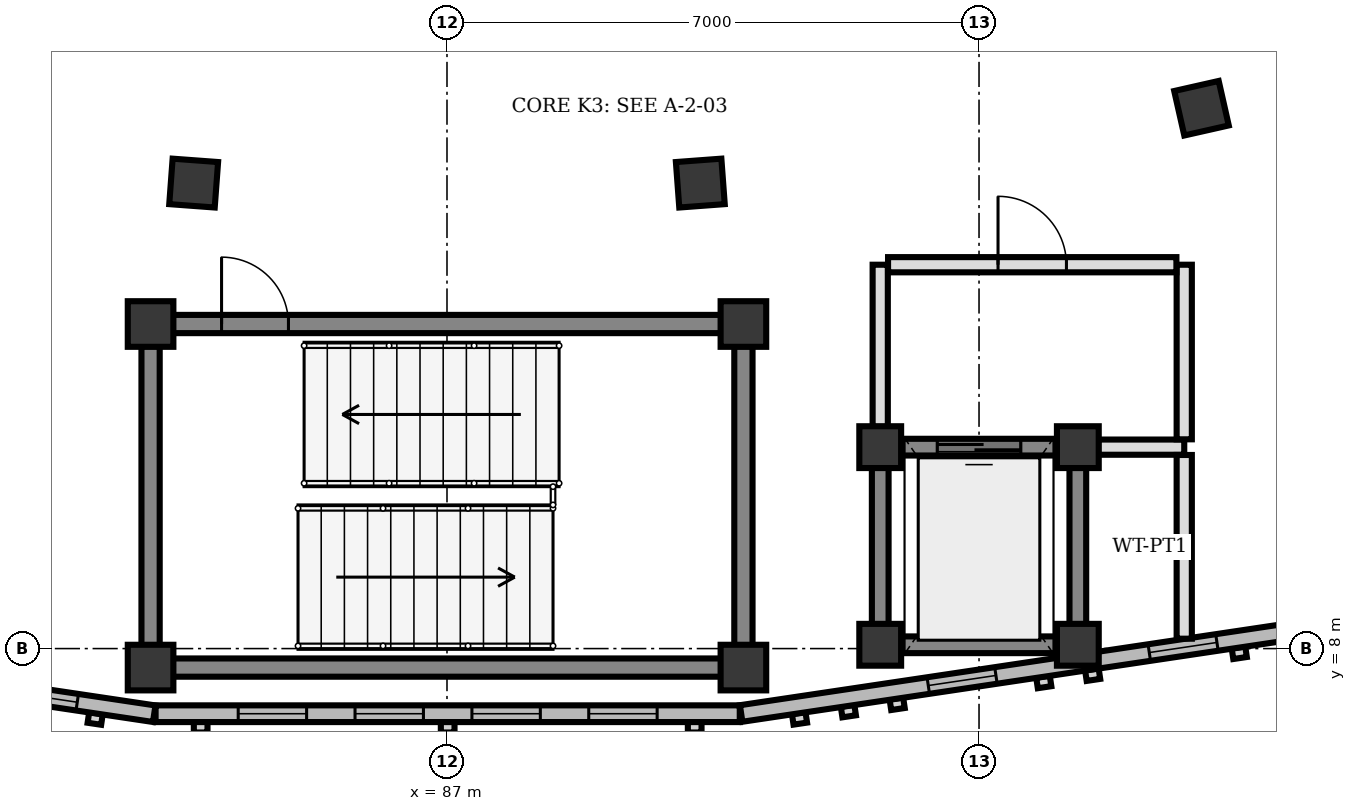
"""IFC4 building model, lengths in metres.
Left out: names, types, materials, properties, quantities, classifications, styles, units other than length and angle.
Written with IfcOpenShell. Run it as: python <this file> out.ifc"""

import sys

from ifc_helpers import new_model, si_unit, direction, frame, frame_2d, origin, origin_2d, place, context, subcontext, project, spatial, rectangle, extrude, element, fill, save


model = new_model("IFC4")
c1 = context("Model", 3, precision=1e-05, world=origin(), true_north=direction((0.0, 1.0)))
c2 = subcontext(c1, "Body", "Model", "MODEL_VIEW")
j1 = project(units=[si_unit("LENGTHUNIT", "METRE"), si_unit("PLANEANGLEUNIT", "RADIAN")], contexts=[c1])
p1 = place(None, origin())
s1 = spatial("IfcSite", under=j1, at=p1, CompositionType="ELEMENT")
p2 = place(p1, origin())
s2 = spatial("IfcBuilding", under=s1, at=p2, CompositionType="ELEMENT")
p3 = place(p2, origin())
s3 = spatial("IfcBuildingStorey", under=s2, at=p3, CompositionType="ELEMENT", Elevation=0.0)
for number, where, z_axis, x_axis in (
    (1, (83.1, 7.75, 0.0), (0.0, 0.0, 1.0), (1.0, 0.0, 0.0)),
    (2, (90.9, 7.75, 0.0), (0.0, 0.0, 1.0), (1.0, 0.0, 0.0)),
    (3, (90.9, 12.27, 0.0), (0.0, 0.0, 1.0), (1.0, 0.0, 0.0)),
    (4, (83.1, 12.27, 0.0), (0.0, 0.0, 1.0), (1.0, 0.0, 0.0)),
):
    element("IfcColumn", number, at=place(p3, frame(where, z_axis=z_axis, x_axis=x_axis)), inside=s3, PredefinedType="COLUMN", context=c2, shape_type="SweptSolid", body=[
        extrude(rectangle(XDim=0.6, YDim=0.6, at=origin_2d()), origin(), (0.0, 0.0, 1.0), 4.5),
    ])
for number, where, z_axis, x_axis in (
    (5, (92.7, 8.05, 0.0), (0.0, 0.0, 1.0), (1.0, 0.0, 0.0)),
    (6, (95.3, 8.05, 0.0), (0.0, 0.0, 1.0), (1.0, 0.0, 0.0)),
    (7, (95.3, 10.65, 0.0), (0.0, 0.0, 1.0), (1.0, 0.0, 0.0)),
    (8, (92.7, 10.65, 0.0), (0.0, 0.0, 1.0), (1.0, 0.0, 0.0)),
):
    element("IfcColumn", number, at=place(p3, frame(where, z_axis=z_axis, x_axis=x_axis)), inside=s3, PredefinedType="COLUMN", context=c2, shape_type="SweptSolid", body=[
        extrude(rectangle(XDim=0.55, YDim=0.55, at=origin_2d()), origin(), (0.0, 0.0, 1.0), 4.5),
    ])
for number, where, z_axis, x_axis in (
    (9, (83.667, 14.124, 0.0), (0.0, 0.0, 1.0), (-0.074, -0.997, 0.0)),
    (10, (90.333, 14.124, 0.0), (0.0, 0.0, 1.0), (0.074, -0.997, 0.0)),
    (11, (96.927, 15.109, 0.0), (0.0, 0.0, 1.0), (0.221, -0.975, 0.0)),
):
    element("IfcColumn", number, at=place(p3, frame(where, z_axis=z_axis, x_axis=x_axis)), inside=s3, PredefinedType="COLUMN", context=c2, shape_type="SweptSolid", body=[
        extrude(rectangle(XDim=0.6, YDim=0.6, at=origin_2d()), origin(), (0.0, 0.0, 1.0), 4.5),
    ])
p4 = place(p3, frame((83.148, 7.143, 0.0), z_axis=(0.0, 0.0, 1.0), x_axis=(-0.989038445117, 0.147658234042, 0.0)))
e12 = element("IfcWall", 12, at=p4, inside=s3, PredefinedType="SOLIDWALL", context=c2, shape_type="SweptSolid", body=[
    extrude(rectangle(XDim=7.368, YDim=0.22, at=frame_2d((3.684, 0.0))), origin(), (0.0, 0.0, 1.0), 3.55),
])
p5 = place(p4, frame((1.024, 0.0, 0.85)))
e13 = element("IfcOpeningElement", 13, at=p5, cuts=e12, PredefinedType="OPENING", context=c2, shape_type="SweptSolid", body=[
    extrude(rectangle(XDim=0.9, YDim=1.4, at=frame_2d((0.45, 0.7))), frame((0.0, 0.12, 0.0), z_axis=(0.0, -1.0, 0.0), x_axis=(1.0, 0.0, 0.0)), (0.0, 0.0, 1.0), 0.24),
])
p6 = place(p4, frame((2.497, 0.0, 0.85)))
e14 = element("IfcOpeningElement", 14, at=p6, cuts=e12, PredefinedType="OPENING", context=c2, shape_type="SweptSolid", body=[
    extrude(rectangle(XDim=0.9, YDim=1.4, at=frame_2d((0.45, 0.7))), frame((0.0, 0.12, 0.0), z_axis=(0.0, -1.0, 0.0), x_axis=(1.0, 0.0, 0.0)), (0.0, 0.0, 1.0), 0.24),
])
p7 = place(p4, frame((3.971, 0.0, 0.85)))
e15 = element("IfcOpeningElement", 15, at=p7, cuts=e12, PredefinedType="OPENING", context=c2, shape_type="SweptSolid", body=[
    extrude(rectangle(XDim=0.9, YDim=1.4, at=frame_2d((0.45, 0.7))), frame((0.0, 0.12, 0.0), z_axis=(0.0, -1.0, 0.0), x_axis=(1.0, 0.0, 0.0)), (0.0, 0.0, 1.0), 0.24),
])
p8 = place(p4, frame((5.444, 0.0, 0.85)))
e16 = element("IfcOpeningElement", 16, at=p8, cuts=e12, PredefinedType="OPENING", context=c2, shape_type="SweptSolid", body=[
    extrude(rectangle(XDim=0.9, YDim=1.4, at=frame_2d((0.45, 0.7))), frame((0.0, 0.12, 0.0), z_axis=(0.0, -1.0, 0.0), x_axis=(1.0, 0.0, 0.0)), (0.0, 0.0, 1.0), 0.24),
])
p9 = place(p3, frame((90.852, 7.143, 0.0), z_axis=(0.0, 0.0, 1.0), x_axis=(-1.0, 0.0, 0.0)))
e17 = element("IfcWall", 17, at=p9, inside=s3, PredefinedType="SOLIDWALL", context=c2, shape_type="SweptSolid", body=[
    extrude(rectangle(XDim=7.686, YDim=0.22, at=frame_2d((3.843, 0.0))), origin(), (0.0, 0.0, 1.0), 3.55),
])
p10 = place(p9, frame((1.087, 0.0, 0.85)))
e18 = element("IfcOpeningElement", 18, at=p10, cuts=e17, PredefinedType="OPENING", context=c2, shape_type="SweptSolid", body=[
    extrude(rectangle(XDim=0.9, YDim=1.4, at=frame_2d((0.45, 0.7))), frame((0.0, 0.12, 0.0), z_axis=(0.0, -1.0, 0.0), x_axis=(1.0, 0.0, 0.0)), (0.0, 0.0, 1.0), 0.24),
])
p11 = place(p9, frame((2.624, 0.0, 0.85)))
e19 = element("IfcOpeningElement", 19, at=p11, cuts=e17, PredefinedType="OPENING", context=c2, shape_type="SweptSolid", body=[
    extrude(rectangle(XDim=0.9, YDim=1.4, at=frame_2d((0.45, 0.7))), frame((0.0, 0.12, 0.0), z_axis=(0.0, -1.0, 0.0), x_axis=(1.0, 0.0, 0.0)), (0.0, 0.0, 1.0), 0.24),
])
p12 = place(p9, frame((4.162, 0.0, 0.85)))
e20 = element("IfcOpeningElement", 20, at=p12, cuts=e17, PredefinedType="OPENING", context=c2, shape_type="SweptSolid", body=[
    extrude(rectangle(XDim=0.9, YDim=1.4, at=frame_2d((0.45, 0.7))), frame((0.0, 0.12, 0.0), z_axis=(0.0, -1.0, 0.0), x_axis=(1.0, 0.0, 0.0)), (0.0, 0.0, 1.0), 0.24),
])
p13 = place(p9, frame((5.699, 0.0, 0.85)))
e21 = element("IfcOpeningElement", 21, at=p13, cuts=e17, PredefinedType="OPENING", context=c2, shape_type="SweptSolid", body=[
    extrude(rectangle(XDim=0.9, YDim=1.4, at=frame_2d((0.45, 0.7))), frame((0.0, 0.12, 0.0), z_axis=(0.0, -1.0, 0.0), x_axis=(1.0, 0.0, 0.0)), (0.0, 0.0, 1.0), 0.24),
])
p14 = place(p3, frame((98.139, 8.231, 0.0), z_axis=(0.0, 0.0, 1.0), x_axis=(-0.989043064047, -0.1476272924, 0.0)))
e22 = element("IfcWall", 22, at=p14, inside=s3, PredefinedType="SOLIDWALL", context=c2, shape_type="SweptSolid", body=[
    extrude(rectangle(XDim=7.349, YDim=0.22, at=frame_2d((3.675, 0.0))), origin(), (0.0, 0.0, 1.0), 3.55),
])
p15 = place(p14, frame((1.02, 0.0, 0.85)))
e23 = element("IfcOpeningElement", 23, at=p15, cuts=e22, PredefinedType="OPENING", context=c2, shape_type="SweptSolid", body=[
    extrude(rectangle(XDim=0.9, YDim=1.4, at=frame_2d((0.45, 0.7))), frame((0.0, 0.12, 0.0), z_axis=(0.0, -1.0, 0.0), x_axis=(1.0, 0.0, 0.0)), (0.0, 0.0, 1.0), 0.24),
])
p16 = place(p14, frame((3.96, 0.0, 0.85)))
e24 = element("IfcOpeningElement", 24, at=p16, cuts=e22, PredefinedType="OPENING", context=c2, shape_type="SweptSolid", body=[
    extrude(rectangle(XDim=0.9, YDim=1.4, at=frame_2d((0.45, 0.7))), frame((0.0, 0.12, 0.0), z_axis=(0.0, -1.0, 0.0), x_axis=(1.0, 0.0, 0.0)), (0.0, 0.0, 1.0), 0.24),
])
for number, where, z_axis, x_axis in (
    (25, (83.1, 8.042, 0.0), (0.0, 0.0, 1.0), (0.0, 1.0, 0.0)),
    (26, (90.9, 11.978, 0.0), (0.0, 0.0, 1.0), (0.0, -1.0, 0.0)),
):
    element("IfcWall", number, at=place(p3, frame(where, z_axis=z_axis, x_axis=x_axis)), inside=s3, PredefinedType="SHEAR", context=c2, shape_type="SweptSolid", body=[
        extrude(rectangle(XDim=3.936, YDim=0.24, at=frame_2d((1.968, 0.0))), origin(), (0.0, 0.0, 1.0), 4.24),
    ])
p17 = place(p3, frame((90.608, 7.75, 0.0), z_axis=(0.0, 0.0, 1.0), x_axis=(-1.0, 0.0, 0.0)))
e27 = element("IfcWall", 27, at=p17, inside=s3, PredefinedType="SHEAR", context=c2, shape_type="SweptSolid", body=[
    extrude(rectangle(XDim=7.216, YDim=0.24, at=frame_2d((3.608, 0.0))), origin(), (0.0, 0.0, 1.0), 4.24),
])
p18 = place(p3, frame((83.392, 12.27, 0.0), z_axis=(0.0, 0.0, 1.0), x_axis=(1.0, 0.0, 0.0)))
e28 = element("IfcWall", 28, at=p18, inside=s3, PredefinedType="SHEAR", context=c2, shape_type="SweptSolid", body=[
    extrude(rectangle(XDim=7.216, YDim=0.24, at=frame_2d((3.608, 0.0))), origin(), (0.0, 0.0, 1.0), 4.24),
])
p19 = place(p18, frame((0.642, 0.0, 0.0)))
e29 = element("IfcOpeningElement", 29, at=p19, cuts=e28, PredefinedType="OPENING", context=c2, shape_type="SweptSolid", body=[
    extrude(rectangle(XDim=0.88, YDim=2.1, at=frame_2d((0.44, 1.05))), frame((0.0, 0.13, 0.0), z_axis=(0.0, -1.0, 0.0), x_axis=(1.0, 0.0, 0.0)), (0.0, 0.0, 1.0), 0.26),
])
p20 = place(p3, frame((92.967, 8.05, 0.0), z_axis=(0.0, 0.0, 1.0), x_axis=(1.0, 0.0, 0.0)))
e30 = element("IfcWall", 30, at=p20, inside=s3, PredefinedType="SHEAR", context=c2, shape_type="SweptSolid", body=[
    extrude(rectangle(XDim=2.066, YDim=0.22, at=frame_2d((1.033, 0.0))), origin(), (0.0, 0.0, 1.0), 4.24),
])
p21 = place(p3, frame((95.3, 8.317, 0.0), z_axis=(0.0, 0.0, 1.0), x_axis=(0.0, 1.0, 0.0)))
e31 = element("IfcWall", 31, at=p21, inside=s3, PredefinedType="SHEAR", context=c2, shape_type="SweptSolid", body=[
    extrude(rectangle(XDim=2.066, YDim=0.22, at=frame_2d((1.033, 0.0))), origin(), (0.0, 0.0, 1.0), 4.24),
])
p22 = place(p3, frame((95.033, 10.65, 0.0), z_axis=(0.0, 0.0, 1.0), x_axis=(-1.0, 0.0, 0.0)))
e32 = element("IfcWall", 32, at=p22, inside=s3, PredefinedType="SHEAR", context=c2, shape_type="SweptSolid", body=[
    extrude(rectangle(XDim=2.066, YDim=0.22, at=frame_2d((1.033, 0.0))), origin(), (0.0, 0.0, 1.0), 4.24),
])
p23 = place(p22, frame((0.483, 0.0, 0.0)))
e33 = element("IfcOpeningElement", 33, at=p23, cuts=e32, PredefinedType="OPENING", context=c2, shape_type="SweptSolid", body=[
    extrude(rectangle(XDim=1.1, YDim=2.15, at=frame_2d((0.55, 1.075))), frame((0.0, 0.12, 0.0), z_axis=(0.0, -1.0, 0.0), x_axis=(1.0, 0.0, 0.0)), (0.0, 0.0, 1.0), 0.24),
])
p24 = place(p3, frame((92.7, 10.383, 0.0), z_axis=(0.0, 0.0, 1.0), x_axis=(0.0, -1.0, 0.0)))
e34 = element("IfcWall", 34, at=p24, inside=s3, PredefinedType="SHEAR", context=c2, shape_type="SweptSolid", body=[
    extrude(rectangle(XDim=2.066, YDim=0.22, at=frame_2d((1.033, 0.0))), origin(), (0.0, 0.0, 1.0), 4.24),
])
p25 = place(p3, frame((92.7, 10.917, 0.0), z_axis=(0.0, 0.0, 1.0), x_axis=(0.0, 1.0, 0.0)))
e35 = element("IfcWall", 35, at=p25, inside=s3, PredefinedType="PARTITIONING", context=c2, shape_type="SweptSolid", body=[
    extrude(rectangle(XDim=2.133, YDim=0.2, at=frame_2d((1.066, 0.0))), origin(), (0.0, 0.0, 1.0), 4.2),
])
p26 = place(p3, frame((95.567, 10.65, 0.0), z_axis=(0.0, 0.0, 1.0), x_axis=(1.0, 0.0, 0.0)))
e36 = element("IfcWall", 36, at=p26, inside=s3, PredefinedType="PARTITIONING", context=c2, shape_type="SweptSolid", body=[
    extrude(rectangle(XDim=1.133, YDim=0.2, at=frame_2d((0.566, 0.0))), origin(), (0.0, 0.0, 1.0), 4.2),
])
p27 = place(p3, frame((96.7, 8.13, 0.0), z_axis=(0.0, 0.0, 1.0), x_axis=(0.0, 1.0, 0.0)))
e37 = element("IfcWall", 37, at=p27, inside=s3, PredefinedType="PARTITIONING", context=c2, shape_type="SweptSolid", body=[
    extrude(rectangle(XDim=2.417, YDim=0.2, at=frame_2d((1.208, 0.0))), origin(), (0.0, 0.0, 1.0), 4.2),
])
p28 = place(p3, frame((96.7, 10.753, 0.0), z_axis=(0.0, 0.0, 1.0), x_axis=(0.0, 1.0, 0.0)))
e38 = element("IfcWall", 38, at=p28, inside=s3, PredefinedType="PARTITIONING", context=c2, shape_type="SweptSolid", body=[
    extrude(rectangle(XDim=2.297, YDim=0.2, at=frame_2d((1.148, 0.0))), origin(), (0.0, 0.0, 1.0), 4.2),
])
p29 = place(p3, frame((92.803, 13.05, 0.0), z_axis=(0.0, 0.0, 1.0), x_axis=(1.0, 0.0, 0.0)))
e39 = element("IfcWall", 39, at=p29, inside=s3, PredefinedType="PARTITIONING", context=c2, shape_type="SweptSolid", body=[
    extrude(rectangle(XDim=3.794, YDim=0.2, at=frame_2d((1.897, 0.0))), origin(), (0.0, 0.0, 1.0), 4.2),
])
p30 = place(p29, frame((1.447, 0.0, 0.0)))
e40 = element("IfcOpeningElement", 40, at=p30, cuts=e39, PredefinedType="OPENING", context=c2, shape_type="SweptSolid", body=[
    extrude(rectangle(XDim=0.9, YDim=2.2, at=frame_2d((0.45, 1.1))), frame((0.0, 0.11, 0.0), z_axis=(0.0, -1.0, 0.0), x_axis=(1.0, 0.0, 0.0)), (0.0, 0.0, 1.0), 0.22),
])
p31 = place(p5, origin())
e41 = element("IfcWindow", 41, at=p31, inside=s3, PartitioningType="SINGLE_PANEL", PredefinedType="WINDOW", context=c2, shape_type="SweptSolid", body=[
    extrude(rectangle(XDim=0.9, YDim=1.4, at=frame_2d((0.45, 0.7))), frame((0.0, 0.03, 0.0), z_axis=(0.0, -1.0, 0.0), x_axis=(1.0, 0.0, 0.0)), (0.0, 0.0, 1.0), 0.06),
])
fill(e13, e41)
p32 = place(p10, origin())
e42 = element("IfcWindow", 42, at=p32, inside=s3, PartitioningType="SINGLE_PANEL", PredefinedType="WINDOW", context=c2, shape_type="SweptSolid", body=[
    extrude(rectangle(XDim=0.9, YDim=1.4, at=frame_2d((0.45, 0.7))), frame((0.0, 0.03, 0.0), z_axis=(0.0, -1.0, 0.0), x_axis=(1.0, 0.0, 0.0)), (0.0, 0.0, 1.0), 0.06),
])
fill(e18, e42)
p33 = place(p11, origin())
e43 = element("IfcWindow", 43, at=p33, inside=s3, PartitioningType="SINGLE_PANEL", PredefinedType="WINDOW", context=c2, shape_type="SweptSolid", body=[
    extrude(rectangle(XDim=0.9, YDim=1.4, at=frame_2d((0.45, 0.7))), frame((0.0, 0.03, 0.0), z_axis=(0.0, -1.0, 0.0), x_axis=(1.0, 0.0, 0.0)), (0.0, 0.0, 1.0), 0.06),
])
fill(e19, e43)
p34 = place(p12, origin())
e44 = element("IfcWindow", 44, at=p34, inside=s3, PartitioningType="SINGLE_PANEL", PredefinedType="WINDOW", context=c2, shape_type="SweptSolid", body=[
    extrude(rectangle(XDim=0.9, YDim=1.4, at=frame_2d((0.45, 0.7))), frame((0.0, 0.03, 0.0), z_axis=(0.0, -1.0, 0.0), x_axis=(1.0, 0.0, 0.0)), (0.0, 0.0, 1.0), 0.06),
])
fill(e20, e44)
p35 = place(p13, origin())
e45 = element("IfcWindow", 45, at=p35, inside=s3, PartitioningType="SINGLE_PANEL", PredefinedType="WINDOW", context=c2, shape_type="SweptSolid", body=[
    extrude(rectangle(XDim=0.9, YDim=1.4, at=frame_2d((0.45, 0.7))), frame((0.0, 0.03, 0.0), z_axis=(0.0, -1.0, 0.0), x_axis=(1.0, 0.0, 0.0)), (0.0, 0.0, 1.0), 0.06),
])
fill(e21, e45)
p36 = place(p15, origin())
e46 = element("IfcWindow", 46, at=p36, inside=s3, PartitioningType="SINGLE_PANEL", PredefinedType="WINDOW", context=c2, shape_type="SweptSolid", body=[
    extrude(rectangle(XDim=0.9, YDim=1.4, at=frame_2d((0.45, 0.7))), frame((0.0, 0.03, 0.0), z_axis=(0.0, -1.0, 0.0), x_axis=(1.0, 0.0, 0.0)), (0.0, 0.0, 1.0), 0.06),
])
fill(e23, e46)
p37 = place(p16, origin())
e47 = element("IfcWindow", 47, at=p37, inside=s3, PartitioningType="SINGLE_PANEL", PredefinedType="WINDOW", context=c2, shape_type="SweptSolid", body=[
    extrude(rectangle(XDim=0.9, YDim=1.4, at=frame_2d((0.45, 0.7))), frame((0.0, 0.03, 0.0), z_axis=(0.0, -1.0, 0.0), x_axis=(1.0, 0.0, 0.0)), (0.0, 0.0, 1.0), 0.06),
])
fill(e24, e47)
p38 = place(p19, origin())
e48 = element("IfcDoor", 48, at=p38, inside=s3, OperationType="SINGLE_SWING_LEFT", PredefinedType="DOOR", context=c2, shape_type="SweptSolid", body=[
    extrude(rectangle(XDim=0.88, YDim=2.1, at=frame_2d((0.44, 1.05))), frame((0.0, 0.025, 0.0), z_axis=(0.0, -1.0, 0.0), x_axis=(1.0, 0.0, 0.0)), (0.0, 0.0, 1.0), 0.05),
])
fill(e29, e48)
p39 = place(p23, origin())
e49 = element("IfcDoor", 49, at=p39, inside=s3, OperationType="DOUBLE_DOOR_SLIDING", PredefinedType="DOOR", context=c2, shape_type="SweptSolid", body=[
    extrude(rectangle(XDim=1.1, YDim=2.15, at=frame_2d((0.55, 1.075))), frame((0.0, 0.025, 0.0), z_axis=(0.0, -1.0, 0.0), x_axis=(1.0, 0.0, 0.0)), (0.0, 0.0, 1.0), 0.05),
])
fill(e33, e49)
p40 = place(p30, origin())
e50 = element("IfcDoor", 50, at=p40, inside=s3, OperationType="SINGLE_SWING_LEFT", PredefinedType="DOOR", context=c2, shape_type="SweptSolid", body=[
    extrude(rectangle(XDim=0.9, YDim=2.2, at=frame_2d((0.45, 1.1))), frame((0.0, 0.025, 0.0), z_axis=(0.0, -1.0, 0.0), x_axis=(1.0, 0.0, 0.0)), (0.0, 0.0, 1.0), 0.05),
])
fill(e40, e50)
save(model, sys.argv[1])
